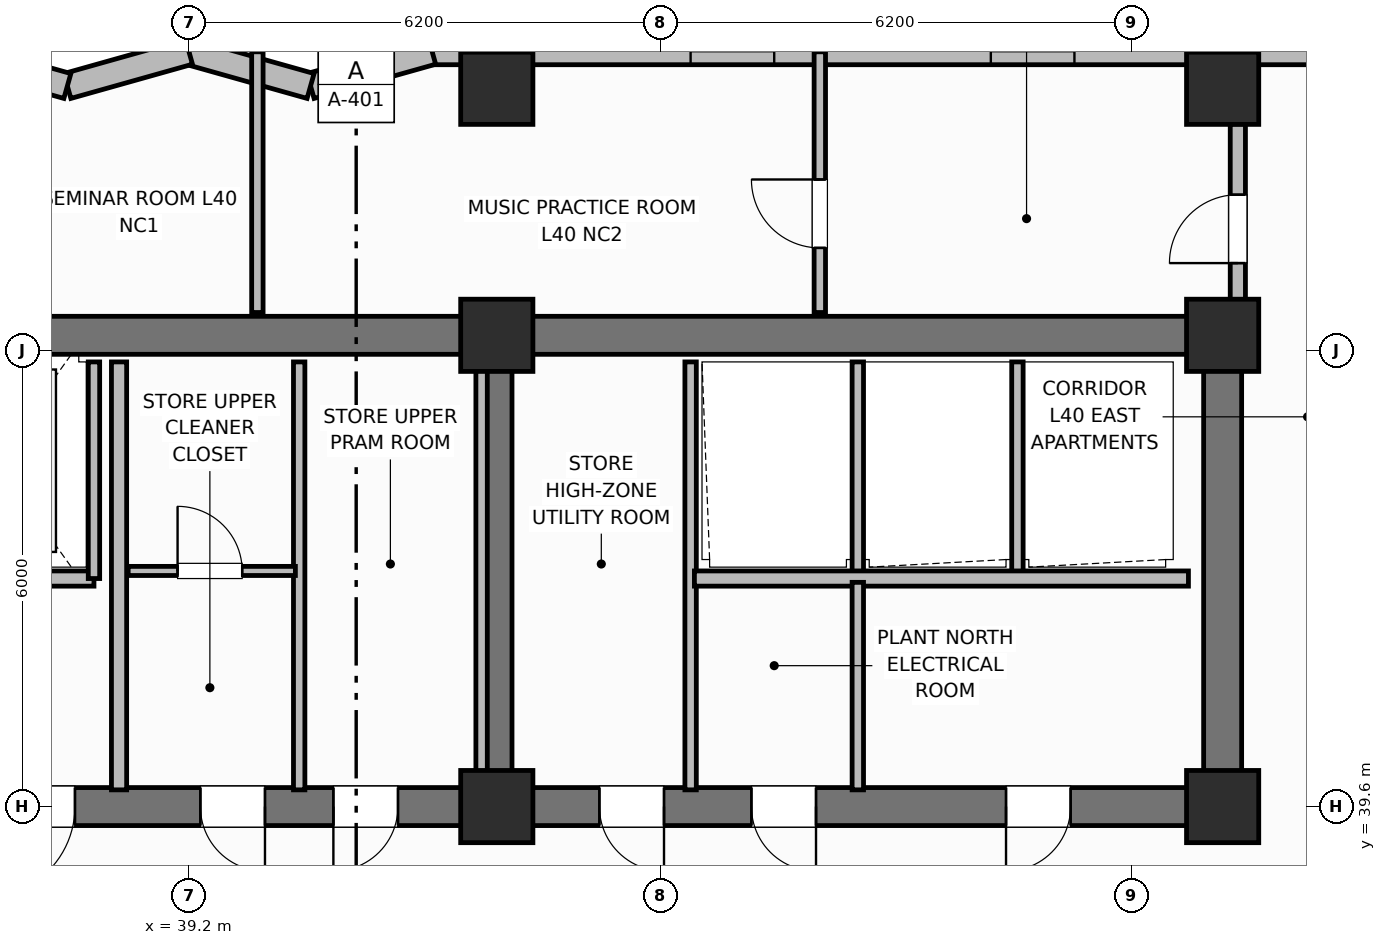
"""IFC4 building model, lengths in metres.
Left out: names, types, materials, properties, quantities, classifications, styles, units other than length and angle.
Written with IfcOpenShell. Run it as: python <this file> out.ifc"""

import sys

from ifc_helpers import new_model, si_unit, direction, frame, frame_2d, origin, origin_2d, place, context, subcontext, project, spatial, rectangle, extrude, element, fill, save


model = new_model("IFC4")
c1 = context("Model", 3, precision=1e-05, world=origin(), true_north=direction((0.0, 1.0)))
c2 = subcontext(c1, "Body", "Model", "MODEL_VIEW")
j1 = project(units=[si_unit("LENGTHUNIT", "METRE"), si_unit("PLANEANGLEUNIT", "RADIAN")], contexts=[c1])
p1 = place(None, origin())
s1 = spatial("IfcSite", under=j1, at=p1, CompositionType="ELEMENT")
p2 = place(p1, origin())
s2 = spatial("IfcBuilding", under=s1, at=p2, CompositionType="ELEMENT")
p3 = place(p2, frame((0.0, 0.0, 162.6)))
s3 = spatial("IfcBuildingStorey", under=s2, at=p3, CompositionType="ELEMENT", Elevation=162.6)
p4 = place(p3, frame((25.6, 45.8, 0.0), z_axis=(0.0, 0.0, 1.0), x_axis=(1.0, 0.0, 0.0)))
e1 = element("IfcWall", 1, at=p4, inside=s3, PredefinedType="SHEAR", context=c2, shape_type="SweptSolid", body=[
    extrude(rectangle(XDim=27.2, YDim=0.5, at=frame_2d((13.6, 0.0))), origin(), (0.0, 0.0, 1.0), 3.7),
])
p5 = place(p3, frame((52.8, 39.85, 0.0), z_axis=(0.0, 0.0, 1.0), x_axis=(0.0, 1.0, 0.0)))
e2 = element("IfcWall", 2, at=p5, inside=s3, PredefinedType="SHEAR", context=c2, shape_type="SweptSolid", body=[
    extrude(rectangle(XDim=5.7, YDim=0.5, at=frame_2d((2.85, 0.0))), origin(), (0.0, 0.0, 1.0), 3.7),
])
p6 = place(p3, frame((52.8, 39.6, 0.0), z_axis=(0.0, 0.0, 1.0), x_axis=(-1.0, 0.0, 0.0)))
e3 = element("IfcWall", 3, at=p6, inside=s3, PredefinedType="SHEAR", context=c2, shape_type="SweptSolid", body=[
    extrude(rectangle(XDim=27.2, YDim=0.5, at=frame_2d((13.6, 0.0))), origin(), (0.0, 0.0, 1.0), 3.7),
])
p7 = place(p6, frame((24.3, 0.0, 0.0)))
e4 = element("IfcOpeningElement", 4, at=p7, cuts=e3, PredefinedType="OPENING", context=c2, shape_type="SweptSolid", body=[
    extrude(rectangle(XDim=1.1, YDim=2.15, at=frame_2d((0.55, 1.075))), frame((0.0, 0.26, 0.0), z_axis=(0.0, -1.0, 0.0), x_axis=(1.0, 0.0, 0.0)), (0.0, 0.0, 1.0), 0.52),
])
p8 = place(p6, frame((21.85, 0.0, 0.0)))
e5 = element("IfcOpeningElement", 5, at=p8, cuts=e3, PredefinedType="OPENING", context=c2, shape_type="SweptSolid", body=[
    extrude(rectangle(XDim=0.85, YDim=2.1, at=frame_2d((0.425, 1.05))), frame((0.0, 0.26, 0.0), z_axis=(0.0, -1.0, 0.0), x_axis=(1.0, 0.0, 0.0)), (0.0, 0.0, 1.0), 0.52),
])
p9 = place(p6, frame((19.85, 0.0, 0.0)))
e6 = element("IfcOpeningElement", 6, at=p9, cuts=e3, PredefinedType="OPENING", context=c2, shape_type="SweptSolid", body=[
    extrude(rectangle(XDim=0.85, YDim=2.1, at=frame_2d((0.425, 1.05))), frame((0.0, 0.26, 0.0), z_axis=(0.0, -1.0, 0.0), x_axis=(1.0, 0.0, 0.0)), (0.0, 0.0, 1.0), 0.52),
])
p10 = place(p6, frame((15.1, 0.0, 0.0)))
e7 = element("IfcOpeningElement", 7, at=p10, cuts=e3, PredefinedType="OPENING", context=c2, shape_type="SweptSolid", body=[
    extrude(rectangle(XDim=1.2, YDim=2.15, at=frame_2d((0.6, 1.075))), frame((0.0, 0.26, 0.0), z_axis=(0.0, -1.0, 0.0), x_axis=(1.0, 0.0, 0.0)), (0.0, 0.0, 1.0), 0.52),
])
p11 = place(p6, frame((12.6, 0.0, 0.0)))
e8 = element("IfcOpeningElement", 8, at=p11, cuts=e3, PredefinedType="OPENING", context=c2, shape_type="SweptSolid", body=[
    extrude(rectangle(XDim=0.85, YDim=2.1, at=frame_2d((0.425, 1.05))), frame((0.0, 0.26, 0.0), z_axis=(0.0, -1.0, 0.0), x_axis=(1.0, 0.0, 0.0)), (0.0, 0.0, 1.0), 0.52),
])
p12 = place(p6, frame((10.85, 0.0, 0.0)))
e9 = element("IfcOpeningElement", 9, at=p12, cuts=e3, PredefinedType="OPENING", context=c2, shape_type="SweptSolid", body=[
    extrude(rectangle(XDim=0.85, YDim=2.1, at=frame_2d((0.425, 1.05))), frame((0.0, 0.26, 0.0), z_axis=(0.0, -1.0, 0.0), x_axis=(1.0, 0.0, 0.0)), (0.0, 0.0, 1.0), 0.52),
])
p13 = place(p6, frame((7.35, 0.0, 0.0)))
e10 = element("IfcOpeningElement", 10, at=p13, cuts=e3, PredefinedType="OPENING", context=c2, shape_type="SweptSolid", body=[
    extrude(rectangle(XDim=0.85, YDim=2.1, at=frame_2d((0.425, 1.05))), frame((0.0, 0.26, 0.0), z_axis=(0.0, -1.0, 0.0), x_axis=(1.0, 0.0, 0.0)), (0.0, 0.0, 1.0), 0.52),
])
p14 = place(p6, frame((5.35, 0.0, 0.0)))
e11 = element("IfcOpeningElement", 11, at=p14, cuts=e3, PredefinedType="OPENING", context=c2, shape_type="SweptSolid", body=[
    extrude(rectangle(XDim=0.85, YDim=2.1, at=frame_2d((0.425, 1.05))), frame((0.0, 0.26, 0.0), z_axis=(0.0, -1.0, 0.0), x_axis=(1.0, 0.0, 0.0)), (0.0, 0.0, 1.0), 0.52),
])
p15 = place(p6, frame((2.0, 0.0, 0.0)))
e12 = element("IfcOpeningElement", 12, at=p15, cuts=e3, PredefinedType="OPENING", context=c2, shape_type="SweptSolid", body=[
    extrude(rectangle(XDim=0.85, YDim=2.1, at=frame_2d((0.425, 1.05))), frame((0.0, 0.26, 0.0), z_axis=(0.0, -1.0, 0.0), x_axis=(1.0, 0.0, 0.0)), (0.0, 0.0, 1.0), 0.52),
])
p16 = place(p3, frame((43.25, 39.85, 0.0), z_axis=(0.0, 0.0, 1.0), x_axis=(0.0, 1.0, 0.0)))
e13 = element("IfcWall", 13, at=p16, inside=s3, PredefinedType="SHEAR", context=c2, shape_type="SweptSolid", body=[
    extrude(rectangle(XDim=5.7, YDim=0.4, at=frame_2d((2.85, 0.0))), origin(), (0.0, 0.0, 1.0), 3.7),
])
for number, where, z_axis, x_axis in (
    (14, (43.25, 39.6, 0.0), (0.0, 0.0, 1.0), (1.0, 0.0, 0.0)),
    (15, (43.25, 45.8, 0.0), (0.0, 0.0, 1.0), (1.0, 0.0, 0.0)),
    (16, (52.8, 39.6, 0.0), (0.0, 0.0, 1.0), (1.0, 0.0, 0.0)),
    (17, (52.8, 45.8, 0.0), (0.0, 0.0, 1.0), (1.0, 0.0, 0.0)),
    (18, (43.25, 49.05, 0.0), (0.0, 0.0, 1.0), (1.0, 0.0, 0.0)),
    (19, (52.8, 49.05, 0.0), (0.0, 0.0, 1.0), (1.0, 0.0, 0.0)),
):
    element("IfcColumn", number, at=place(p3, frame(where, z_axis=z_axis, x_axis=x_axis)), inside=s3, PredefinedType="COLUMN", context=c2, shape_type="SweptSolid", body=[
        extrude(rectangle(XDim=0.95, YDim=0.95, at=origin_2d()), origin(), (0.0, 0.0, 1.0), 3.7),
    ])
p17 = place(p3, frame((58.2, 49.53, 0.0), z_axis=(0.0, 0.0, 1.0), x_axis=(-1.0, 0.0, 0.0)))
e20 = element("IfcWall", 20, at=p17, inside=s3, PredefinedType="SOLIDWALL", context=c2, shape_type="SweptSolid", body=[
    extrude(rectangle(XDim=15.8, YDim=0.34, at=frame_2d((7.9, 0.0))), origin(), (0.0, 0.0, 1.0), 2.72),
])
p18 = place(p17, frame((1.55, 0.0, 0.95)))
e21 = element("IfcOpeningElement", 21, at=p18, cuts=e20, PredefinedType="OPENING", context=c2, shape_type="SweptSolid", body=[
    extrude(rectangle(XDim=1.1, YDim=1.65, at=frame_2d((0.55, 0.825))), frame((0.0, 0.18, 0.0), z_axis=(0.0, -1.0, 0.0), x_axis=(1.0, 0.0, 0.0)), (0.0, 0.0, 1.0), 0.36),
])
p19 = place(p17, frame((7.35, 0.0, 0.95)))
e22 = element("IfcOpeningElement", 22, at=p19, cuts=e20, PredefinedType="OPENING", context=c2, shape_type="SweptSolid", body=[
    extrude(rectangle(XDim=1.1, YDim=1.65, at=frame_2d((0.55, 0.825))), frame((0.0, 0.18, 0.0), z_axis=(0.0, -1.0, 0.0), x_axis=(1.0, 0.0, 0.0)), (0.0, 0.0, 1.0), 0.36),
])
p20 = place(p17, frame((11.3, 0.0, 0.95)))
e23 = element("IfcOpeningElement", 23, at=p20, cuts=e20, PredefinedType="OPENING", context=c2, shape_type="SweptSolid", body=[
    extrude(rectangle(XDim=1.1, YDim=1.65, at=frame_2d((0.55, 0.825))), frame((0.0, 0.18, 0.0), z_axis=(0.0, -1.0, 0.0), x_axis=(1.0, 0.0, 0.0)), (0.0, 0.0, 1.0), 0.36),
])
p21 = place(p3, frame((42.4, 49.53, 0.0), z_axis=(0.0, 0.0, 1.0), x_axis=(-0.962652136636, -0.270741322725, 0.0)))
e24 = element("IfcWall", 24, at=p21, inside=s3, PredefinedType="SOLIDWALL", context=c2, shape_type="SweptSolid", body=[
    extrude(rectangle(XDim=1.662, YDim=0.34, at=frame_2d((0.831, 0.0))), origin(), (0.0, 0.0, 1.0), 2.72),
])
p22 = place(p3, frame((40.8, 49.08, 0.0), z_axis=(0.0, 0.0, 1.0), x_axis=(-0.962662902433, 0.270703040766, 0.0)))
e25 = element("IfcWall", 25, at=p22, inside=s3, PredefinedType="SOLIDWALL", context=c2, shape_type="SweptSolid", body=[
    extrude(rectangle(XDim=1.662, YDim=0.34, at=frame_2d((0.831, 0.0))), origin(), (0.0, 0.0, 1.0), 2.72),
])
p23 = place(p3, frame((39.2, 49.53, 0.0), z_axis=(0.0, 0.0, 1.0), x_axis=(-0.962652136636, -0.270741322725, 0.0)))
e26 = element("IfcWall", 26, at=p23, inside=s3, PredefinedType="SOLIDWALL", context=c2, shape_type="SweptSolid", body=[
    extrude(rectangle(XDim=1.662, YDim=0.34, at=frame_2d((0.831, 0.0))), origin(), (0.0, 0.0, 1.0), 2.72),
])
p24 = place(p3, frame((37.6, 49.08, 0.0), z_axis=(0.0, 0.0, 1.0), x_axis=(-0.962662902433, 0.270703040766, 0.0)))
e27 = element("IfcWall", 27, at=p24, inside=s3, PredefinedType="SOLIDWALL", context=c2, shape_type="SweptSolid", body=[
    extrude(rectangle(XDim=1.662, YDim=0.34, at=frame_2d((0.831, 0.0))), origin(), (0.0, 0.0, 1.0), 2.72),
])
p25 = place(p3, frame((37.95, 42.6, 0.0), z_axis=(0.0, 0.0, 1.0), x_axis=(-1.0, 0.0, 0.0)))
e28 = element("IfcWall", 28, at=p25, inside=s3, PredefinedType="PARTITIONING", context=c2, shape_type="SweptSolid", body=[
    extrude(rectangle(XDim=2.55, YDim=0.2, at=frame_2d((1.275, 0.0))), origin(), (0.0, 0.0, 1.0), 2.32),
])
p26 = place(p25, frame((0.75, 0.0, 0.0)))
e29 = element("IfcOpeningElement", 29, at=p26, cuts=e28, PredefinedType="OPENING", context=c2, shape_type="SweptSolid", body=[
    extrude(rectangle(XDim=1.1, YDim=2.15, at=frame_2d((0.55, 1.075))), frame((0.0, 0.11, 0.0), z_axis=(0.0, -1.0, 0.0), x_axis=(1.0, 0.0, 0.0)), (0.0, 0.0, 1.0), 0.22),
])
p27 = place(p3, frame((37.95, 42.6, 0.0), z_axis=(0.0, 0.0, 1.0), x_axis=(0.0, 1.0, 0.0)))
e30 = element("IfcWall", 30, at=p27, inside=s3, PredefinedType="PARTITIONING", context=c2, shape_type="SweptSolid", body=[
    extrude(rectangle(XDim=2.85, YDim=0.15, at=frame_2d((1.425, 0.0))), origin(), (0.0, 0.0, 1.0), 2.55),
])
p28 = place(p3, frame((38.28, 39.82, 0.0), z_axis=(0.0, 0.0, 1.0), x_axis=(0.0, 1.0, 0.0)))
e31 = element("IfcWall", 31, at=p28, inside=s3, PredefinedType="PARTITIONING", context=c2, shape_type="SweptSolid", body=[
    extrude(rectangle(XDim=5.63, YDim=0.2, at=frame_2d((2.815, 0.0))), origin(), (0.0, 0.0, 1.0), 2.55),
])
for number, where, z_axis, x_axis in (
    (32, (43.05, 39.82, 0.0), (0.0, 0.0, 1.0), (0.0, 1.0, 0.0)),
    (33, (40.65, 39.82, 0.0), (0.0, 0.0, 1.0), (0.0, 1.0, 0.0)),
):
    element("IfcWall", number, at=place(p3, frame(where, z_axis=z_axis, x_axis=x_axis)), inside=s3, PredefinedType="PARTITIONING", context=c2, shape_type="SweptSolid", body=[
        extrude(rectangle(XDim=5.63, YDim=0.15, at=frame_2d((2.815, 0.0))), origin(), (0.0, 0.0, 1.0), 2.55),
    ])
p29 = place(p3, frame((38.4, 42.7, 0.0), z_axis=(0.0, 0.0, 1.0), x_axis=(1.0, 0.0, 0.0)))
e34 = element("IfcWall", 34, at=p29, inside=s3, PredefinedType="PARTITIONING", context=c2, shape_type="SweptSolid", body=[
    extrude(rectangle(XDim=2.2, YDim=0.12, at=frame_2d((1.1, 0.0))), origin(), (0.0, 0.0, 1.0), 2.32),
])
p30 = place(p29, frame((0.65, 0.0, 0.0)))
e35 = element("IfcOpeningElement", 35, at=p30, cuts=e34, PredefinedType="OPENING", context=c2, shape_type="SweptSolid", body=[
    extrude(rectangle(XDim=0.85, YDim=2.1, at=frame_2d((0.425, 1.05))), frame((0.0, 0.07, 0.0), z_axis=(0.0, -1.0, 0.0), x_axis=(1.0, 0.0, 0.0)), (0.0, 0.0, 1.0), 0.14),
])
p31 = place(p3, frame((45.8, 39.82, 0.0), z_axis=(0.0, 0.0, 1.0), x_axis=(0.0, 1.0, 0.0)))
e36 = element("IfcWall", 36, at=p31, inside=s3, PredefinedType="PARTITIONING", context=c2, shape_type="SweptSolid", body=[
    extrude(rectangle(XDim=5.63, YDim=0.15, at=frame_2d((2.815, 0.0))), origin(), (0.0, 0.0, 1.0), 2.55),
])
for number, where, z_axis, x_axis in (
    (37, (48.0, 42.65, 0.0), (0.0, 0.0, 1.0), (0.0, 1.0, 0.0)),
    (38, (50.1, 42.65, 0.0), (0.0, 0.0, 1.0), (0.0, 1.0, 0.0)),
):
    element("IfcWall", number, at=place(p3, frame(where, z_axis=z_axis, x_axis=x_axis)), inside=s3, PredefinedType="PARTITIONING", context=c2, shape_type="SweptSolid", body=[
        extrude(rectangle(XDim=2.8, YDim=0.15, at=frame_2d((1.4, 0.0))), origin(), (0.0, 0.0, 1.0), 2.55),
    ])
p32 = place(p3, frame((52.35, 42.6, 0.0), z_axis=(0.0, 0.0, 1.0), x_axis=(-1.0, 0.0, 0.0)))
e39 = element("IfcWall", 39, at=p32, inside=s3, PredefinedType="PARTITIONING", context=c2, shape_type="SweptSolid", body=[
    extrude(rectangle(XDim=6.5, YDim=0.2, at=frame_2d((3.25, 0.0))), origin(), (0.0, 0.0, 1.0), 2.55),
])
p33 = place(p3, frame((48.0, 39.82, 0.0), z_axis=(0.0, 0.0, 1.0), x_axis=(0.0, 1.0, 0.0)))
e40 = element("IfcWall", 40, at=p33, inside=s3, PredefinedType="PARTITIONING", context=c2, shape_type="SweptSolid", body=[
    extrude(rectangle(XDim=2.73, YDim=0.15, at=frame_2d((1.365, 0.0))), origin(), (0.0, 0.0, 1.0), 2.55),
])
p34 = place(p3, frame((40.1, 46.1, 0.0), z_axis=(0.0, 0.0, 1.0), x_axis=(0.0, 1.0, 0.0)))
e41 = element("IfcWall", 41, at=p34, inside=s3, PredefinedType="PARTITIONING", context=c2, shape_type="SweptSolid", body=[
    extrude(rectangle(XDim=3.43, YDim=0.15, at=frame_2d((1.715, 0.0))), origin(), (0.0, 0.0, 1.0), 2.55),
])
p35 = place(p3, frame((47.5, 46.1, 0.0), z_axis=(0.0, 0.0, 1.0), x_axis=(0.0, 1.0, 0.0)))
e42 = element("IfcWall", 42, at=p35, inside=s3, PredefinedType="PARTITIONING", context=c2, shape_type="SweptSolid", body=[
    extrude(rectangle(XDim=3.43, YDim=0.15, at=frame_2d((1.715, 0.0))), origin(), (0.0, 0.0, 1.0), 2.55),
])
p36 = place(p35, frame((0.85, 0.0, 0.0)))
e43 = element("IfcOpeningElement", 43, at=p36, cuts=e42, PredefinedType="OPENING", context=c2, shape_type="SweptSolid", body=[
    extrude(rectangle(XDim=0.9, YDim=2.1, at=frame_2d((0.45, 1.05))), frame((0.0, 0.085, 0.0), z_axis=(0.0, -1.0, 0.0), x_axis=(1.0, 0.0, 0.0)), (0.0, 0.0, 1.0), 0.17),
])
p37 = place(p3, frame((53.0, 46.1, 0.0), z_axis=(0.0, 0.0, 1.0), x_axis=(0.0, 1.0, 0.0)))
e44 = element("IfcWall", 44, at=p37, inside=s3, PredefinedType="PARTITIONING", context=c2, shape_type="SweptSolid", body=[
    extrude(rectangle(XDim=2.48, YDim=0.2, at=frame_2d((1.24, 0.0))), origin(), (0.0, 0.0, 1.0), 2.55),
])
p38 = place(p37, frame((0.65, 0.0, 0.0)))
e45 = element("IfcOpeningElement", 45, at=p38, cuts=e44, PredefinedType="OPENING", context=c2, shape_type="SweptSolid", body=[
    extrude(rectangle(XDim=0.9, YDim=2.1, at=frame_2d((0.45, 1.05))), frame((0.0, 0.11, 0.0), z_axis=(0.0, -1.0, 0.0), x_axis=(1.0, 0.0, 0.0)), (0.0, 0.0, 1.0), 0.22),
])
p39 = place(p19, origin())
e46 = element("IfcWindow", 46, at=p39, inside=s3, PartitioningType="SINGLE_PANEL", PredefinedType="WINDOW", context=c2, shape_type="SweptSolid", body=[
    extrude(rectangle(XDim=1.1, YDim=1.65, at=frame_2d((0.55, 0.825))), frame((0.0, 0.03, 0.0), z_axis=(0.0, -1.0, 0.0), x_axis=(1.0, 0.0, 0.0)), (0.0, 0.0, 1.0), 0.06),
])
fill(e22, e46)
p40 = place(p20, origin())
e47 = element("IfcWindow", 47, at=p40, inside=s3, PartitioningType="SINGLE_PANEL", PredefinedType="WINDOW", context=c2, shape_type="SweptSolid", body=[
    extrude(rectangle(XDim=1.1, YDim=1.65, at=frame_2d((0.55, 0.825))), frame((0.0, 0.03, 0.0), z_axis=(0.0, -1.0, 0.0), x_axis=(1.0, 0.0, 0.0)), (0.0, 0.0, 1.0), 0.06),
])
fill(e23, e47)
p41 = place(p30, origin())
e48 = element("IfcDoor", 48, at=p41, inside=s3, OperationType="SINGLE_SWING_LEFT", PredefinedType="DOOR", context=c2, shape_type="SweptSolid", body=[
    extrude(rectangle(XDim=0.85, YDim=2.1, at=frame_2d((0.425, 1.05))), frame((0.0, 0.025, 0.0), z_axis=(0.0, -1.0, 0.0), x_axis=(1.0, 0.0, 0.0)), (0.0, 0.0, 1.0), 0.05),
])
fill(e35, e48)
p42 = place(p36, origin())
e49 = element("IfcDoor", 49, at=p42, inside=s3, OperationType="SINGLE_SWING_RIGHT", PredefinedType="DOOR", context=c2, shape_type="SweptSolid", body=[
    extrude(rectangle(XDim=0.9, YDim=2.1, at=frame_2d((0.45, 1.05))), frame((0.0, 0.025, 0.0), z_axis=(0.0, -1.0, 0.0), x_axis=(1.0, 0.0, 0.0)), (0.0, 0.0, 1.0), 0.05),
])
fill(e43, e49)
p43 = place(p38, origin())
e50 = element("IfcDoor", 50, at=p43, inside=s3, OperationType="SINGLE_SWING_LEFT", PredefinedType="DOOR", context=c2, shape_type="SweptSolid", body=[
    extrude(rectangle(XDim=0.9, YDim=2.1, at=frame_2d((0.45, 1.05))), frame((0.0, 0.025, 0.0), z_axis=(0.0, -1.0, 0.0), x_axis=(1.0, 0.0, 0.0)), (0.0, 0.0, 1.0), 0.05),
])
fill(e45, e50)
p44 = place(p10, origin())
e51 = element("IfcDoor", 51, at=p44, inside=s3, OperationType="SINGLE_SWING_RIGHT", PredefinedType="DOOR", context=c2, shape_type="SweptSolid", body=[
    extrude(rectangle(XDim=1.2, YDim=2.15, at=frame_2d((0.6, 1.075))), frame((0.0, 0.025, 0.0), z_axis=(0.0, -1.0, 0.0), x_axis=(1.0, 0.0, 0.0)), (0.0, 0.0, 1.0), 0.05),
])
fill(e7, e51)
p45 = place(p11, origin())
e52 = element("IfcDoor", 52, at=p45, inside=s3, OperationType="SINGLE_SWING_LEFT", PredefinedType="DOOR", context=c2, shape_type="SweptSolid", body=[
    extrude(rectangle(XDim=0.85, YDim=2.1, at=frame_2d((0.425, 1.05))), frame((0.0, 0.025, 0.0), z_axis=(0.0, -1.0, 0.0), x_axis=(1.0, 0.0, 0.0)), (0.0, 0.0, 1.0), 0.05),
])
fill(e8, e52)
p46 = place(p12, origin())
e53 = element("IfcDoor", 53, at=p46, inside=s3, OperationType="SINGLE_SWING_RIGHT", PredefinedType="DOOR", context=c2, shape_type="SweptSolid", body=[
    extrude(rectangle(XDim=0.85, YDim=2.1, at=frame_2d((0.425, 1.05))), frame((0.0, 0.025, 0.0), z_axis=(0.0, -1.0, 0.0), x_axis=(1.0, 0.0, 0.0)), (0.0, 0.0, 1.0), 0.05),
])
fill(e9, e53)
p47 = place(p13, origin())
e54 = element("IfcDoor", 54, at=p47, inside=s3, OperationType="SINGLE_SWING_LEFT", PredefinedType="DOOR", context=c2, shape_type="SweptSolid", body=[
    extrude(rectangle(XDim=0.85, YDim=2.1, at=frame_2d((0.425, 1.05))), frame((0.0, 0.025, 0.0), z_axis=(0.0, -1.0, 0.0), x_axis=(1.0, 0.0, 0.0)), (0.0, 0.0, 1.0), 0.05),
])
fill(e10, e54)
p48 = place(p14, origin())
e55 = element("IfcDoor", 55, at=p48, inside=s3, OperationType="SINGLE_SWING_LEFT", PredefinedType="DOOR", context=c2, shape_type="SweptSolid", body=[
    extrude(rectangle(XDim=0.85, YDim=2.1, at=frame_2d((0.425, 1.05))), frame((0.0, 0.025, 0.0), z_axis=(0.0, -1.0, 0.0), x_axis=(1.0, 0.0, 0.0)), (0.0, 0.0, 1.0), 0.05),
])
fill(e11, e55)
p49 = place(p15, origin())
e56 = element("IfcDoor", 56, at=p49, inside=s3, OperationType="SINGLE_SWING_RIGHT", PredefinedType="DOOR", context=c2, shape_type="SweptSolid", body=[
    extrude(rectangle(XDim=0.85, YDim=2.1, at=frame_2d((0.425, 1.05))), frame((0.0, 0.025, 0.0), z_axis=(0.0, -1.0, 0.0), x_axis=(1.0, 0.0, 0.0)), (0.0, 0.0, 1.0), 0.05),
])
fill(e12, e56)
save(model, sys.argv[1])
